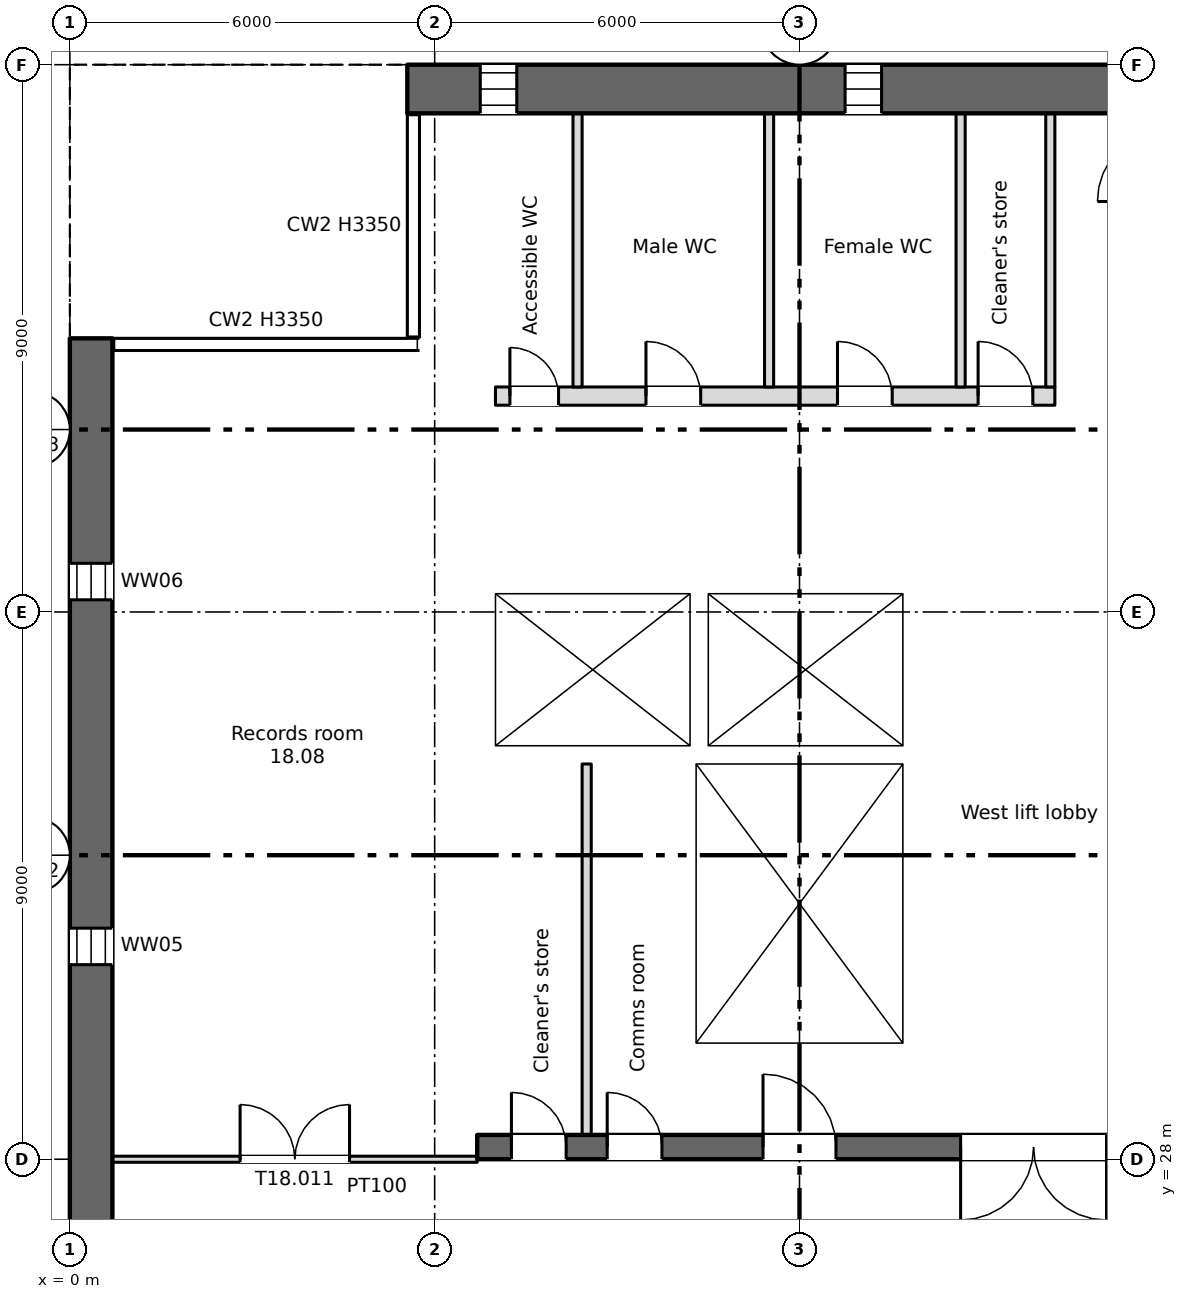
"""IFC4 building model, lengths in metres.
Left out: names, types, materials, properties, quantities, classifications, styles, units other than length and angle.
Written with IfcOpenShell. Run it as: python <this file> out.ifc"""

import sys

from ifc_helpers import new_model, si_unit, direction, frame, frame_2d, origin, place, context, subcontext, project, spatial, rectangle, extrude, element, fill, save


model = new_model("IFC4")
c1 = context("Model", 3, precision=1e-05, world=origin(), true_north=direction((0.0, 1.0)))
c2 = subcontext(c1, "Body", "Model", "MODEL_VIEW")
j1 = project(units=[si_unit("LENGTHUNIT", "METRE"), si_unit("PLANEANGLEUNIT", "RADIAN")], contexts=[c1])
p1 = place(None, origin())
s1 = spatial("IfcSite", under=j1, at=p1, CompositionType="ELEMENT")
p2 = place(p1, origin())
s2 = spatial("IfcBuilding", under=s1, at=p2, CompositionType="ELEMENT")
p3 = place(p2, frame((0.0, 0.0, 113.75)))
s3 = spatial("IfcBuildingStorey", under=s2, at=p3, CompositionType="ELEMENT", Elevation=113.75)
p4 = place(p3, frame((0.35, 6.0, 0.0), z_axis=(0.0, 0.0, 1.0), x_axis=(0.0, 1.0, 0.0)))
e1 = element("IfcWall", 1, at=p4, inside=s3, PredefinedType="SHEAR", context=c2, shape_type="SweptSolid", body=[
    extrude(rectangle(XDim=35.5, YDim=0.7, at=frame_2d((17.75, 0.0))), origin(), (0.0, 0.0, 1.0), 3.35),
])
p5 = place(p4, frame((1.2, 0.0, 0.6)))
e2 = element("IfcOpeningElement", 2, at=p5, cuts=e1, PredefinedType="OPENING", context=c2, shape_type="SweptSolid", body=[
    extrude(rectangle(XDim=0.6, YDim=2.4, at=frame_2d((0.3, 1.2))), frame((0.0, 0.36, 0.0), z_axis=(0.0, -1.0, 0.0), x_axis=(1.0, 0.0, 0.0)), (0.0, 0.0, 1.0), 0.72),
])
p6 = place(p4, frame((7.2, 0.0, 0.6)))
e3 = element("IfcOpeningElement", 3, at=p6, cuts=e1, PredefinedType="OPENING", context=c2, shape_type="SweptSolid", body=[
    extrude(rectangle(XDim=0.6, YDim=2.4, at=frame_2d((0.3, 1.2))), frame((0.0, 0.36, 0.0), z_axis=(0.0, -1.0, 0.0), x_axis=(1.0, 0.0, 0.0)), (0.0, 0.0, 1.0), 0.72),
])
p7 = place(p4, frame((13.2, 0.0, 0.6)))
e4 = element("IfcOpeningElement", 4, at=p7, cuts=e1, PredefinedType="OPENING", context=c2, shape_type="SweptSolid", body=[
    extrude(rectangle(XDim=0.6, YDim=2.4, at=frame_2d((0.3, 1.2))), frame((0.0, 0.36, 0.0), z_axis=(0.0, -1.0, 0.0), x_axis=(1.0, 0.0, 0.0)), (0.0, 0.0, 1.0), 0.72),
])
p8 = place(p4, frame((19.2, 0.0, 0.6)))
e5 = element("IfcOpeningElement", 5, at=p8, cuts=e1, PredefinedType="OPENING", context=c2, shape_type="SweptSolid", body=[
    extrude(rectangle(XDim=0.6, YDim=2.4, at=frame_2d((0.3, 1.2))), frame((0.0, 0.36, 0.0), z_axis=(0.0, -1.0, 0.0), x_axis=(1.0, 0.0, 0.0)), (0.0, 0.0, 1.0), 0.72),
])
p9 = place(p4, frame((25.2, 0.0, 0.6)))
e6 = element("IfcOpeningElement", 6, at=p9, cuts=e1, PredefinedType="OPENING", context=c2, shape_type="SweptSolid", body=[
    extrude(rectangle(XDim=0.6, YDim=2.4, at=frame_2d((0.3, 1.2))), frame((0.0, 0.36, 0.0), z_axis=(0.0, -1.0, 0.0), x_axis=(1.0, 0.0, 0.0)), (0.0, 0.0, 1.0), 0.72),
])
p10 = place(p4, frame((31.2, 0.0, 0.6)))
e7 = element("IfcOpeningElement", 7, at=p10, cuts=e1, PredefinedType="OPENING", context=c2, shape_type="SweptSolid", body=[
    extrude(rectangle(XDim=0.6, YDim=2.4, at=frame_2d((0.3, 1.2))), frame((0.0, 0.36, 0.0), z_axis=(0.0, -1.0, 0.0), x_axis=(1.0, 0.0, 0.0)), (0.0, 0.0, 1.0), 0.72),
])
p11 = place(p3, frame((5.55, 45.6, 0.0), z_axis=(0.0, 0.0, 1.0), x_axis=(1.0, 0.0, 0.0)))
e8 = element("IfcWall", 8, at=p11, inside=s3, PredefinedType="SHEAR", context=c2, shape_type="SweptSolid", body=[
    extrude(rectangle(XDim=60.9, YDim=0.8, at=frame_2d((30.45, 0.0))), origin(), (0.0, 0.0, 1.0), 3.35),
])
p12 = place(p11, frame((1.2, 0.0, 0.6)))
e9 = element("IfcOpeningElement", 9, at=p12, cuts=e8, PredefinedType="OPENING", context=c2, shape_type="SweptSolid", body=[
    extrude(rectangle(XDim=0.6, YDim=2.4, at=frame_2d((0.3, 1.2))), frame((0.0, 0.41, 0.0), z_axis=(0.0, -1.0, 0.0), x_axis=(1.0, 0.0, 0.0)), (0.0, 0.0, 1.0), 0.82),
])
p13 = place(p11, frame((7.2, 0.0, 0.6)))
e10 = element("IfcOpeningElement", 10, at=p13, cuts=e8, PredefinedType="OPENING", context=c2, shape_type="SweptSolid", body=[
    extrude(rectangle(XDim=0.6, YDim=2.4, at=frame_2d((0.3, 1.2))), frame((0.0, 0.41, 0.0), z_axis=(0.0, -1.0, 0.0), x_axis=(1.0, 0.0, 0.0)), (0.0, 0.0, 1.0), 0.82),
])
p14 = place(p3, frame((6.7, 28.2, 0.0), z_axis=(0.0, 0.0, 1.0), x_axis=(1.0, 0.0, 0.0)))
e11 = element("IfcWall", 11, at=p14, inside=s3, PredefinedType="SHEAR", context=c2, shape_type="SweptSolid", body=[
    extrude(rectangle(XDim=57.8, YDim=0.4, at=frame_2d((28.9, 0.0))), origin(), (0.0, 0.0, 1.0), 3.35),
])
p15 = place(p14, frame((12.562, 0.0, 0.0)))
e12 = element("IfcOpeningElement", 12, at=p15, cuts=e11, PredefinedType="OPENING", context=c2, shape_type="SweptSolid", body=[
    extrude(rectangle(XDim=0.9, YDim=2.1, at=frame_2d((0.45, 1.05))), frame((0.0, 0.21, 0.0), z_axis=(0.0, -1.0, 0.0), x_axis=(1.0, 0.0, 0.0)), (0.0, 0.0, 1.0), 0.42),
])
p16 = place(p14, frame((15.137, 0.0, 0.0)))
e13 = element("IfcOpeningElement", 13, at=p16, cuts=e11, PredefinedType="OPENING", context=c2, shape_type="SweptSolid", body=[
    extrude(rectangle(XDim=0.9, YDim=2.1, at=frame_2d((0.45, 1.05))), frame((0.0, 0.21, 0.0), z_axis=(0.0, -1.0, 0.0), x_axis=(1.0, 0.0, 0.0)), (0.0, 0.0, 1.0), 0.42),
])
p17 = place(p14, frame((49.85, 0.0, 0.0)))
e14 = element("IfcOpeningElement", 14, at=p17, cuts=e11, PredefinedType="OPENING", context=c2, shape_type="SweptSolid", body=[
    extrude(rectangle(XDim=0.9, YDim=2.1, at=frame_2d((0.45, 1.05))), frame((0.0, 0.21, 0.0), z_axis=(0.0, -1.0, 0.0), x_axis=(1.0, 0.0, 0.0)), (0.0, 0.0, 1.0), 0.42),
])
p18 = place(p14, frame((0.562, 0.0, 0.0)))
e15 = element("IfcOpeningElement", 15, at=p18, cuts=e11, PredefinedType="OPENING", context=c2, shape_type="SweptSolid", body=[
    extrude(rectangle(XDim=0.9, YDim=2.1, at=frame_2d((0.45, 1.05))), frame((0.0, 0.21, 0.0), z_axis=(0.0, -1.0, 0.0), x_axis=(1.0, 0.0, 0.0)), (0.0, 0.0, 1.0), 0.42),
])
p19 = place(p14, frame((2.137, 0.0, 0.0)))
e16 = element("IfcOpeningElement", 16, at=p19, cuts=e11, PredefinedType="OPENING", context=c2, shape_type="SweptSolid", body=[
    extrude(rectangle(XDim=0.9, YDim=2.1, at=frame_2d((0.45, 1.05))), frame((0.0, 0.21, 0.0), z_axis=(0.0, -1.0, 0.0), x_axis=(1.0, 0.0, 0.0)), (0.0, 0.0, 1.0), 0.42),
])
p20 = place(p14, frame((4.7, 0.0, 0.0)))
e17 = element("IfcOpeningElement", 17, at=p20, cuts=e11, PredefinedType="OPENING", context=c2, shape_type="SweptSolid", body=[
    extrude(rectangle(XDim=1.2, YDim=2.1, at=frame_2d((0.6, 1.05))), frame((0.0, 0.21, 0.0), z_axis=(0.0, -1.0, 0.0), x_axis=(1.0, 0.0, 0.0)), (0.0, 0.0, 1.0), 0.42),
])
p21 = place(p14, frame((31.7, 0.0, 0.0)))
e18 = element("IfcOpeningElement", 18, at=p21, cuts=e11, PredefinedType="OPENING", context=c2, shape_type="SweptSolid", body=[
    extrude(rectangle(XDim=1.2, YDim=2.1, at=frame_2d((0.6, 1.05))), frame((0.0, 0.21, 0.0), z_axis=(0.0, -1.0, 0.0), x_axis=(1.0, 0.0, 0.0)), (0.0, 0.0, 1.0), 0.42),
])
p22 = place(p14, frame((55.2, 0.0, 0.0)))
e19 = element("IfcOpeningElement", 19, at=p22, cuts=e11, PredefinedType="OPENING", context=c2, shape_type="SweptSolid", body=[
    extrude(rectangle(XDim=1.2, YDim=2.1, at=frame_2d((0.6, 1.05))), frame((0.0, 0.21, 0.0), z_axis=(0.0, -1.0, 0.0), x_axis=(1.0, 0.0, 0.0)), (0.0, 0.0, 1.0), 0.42),
])
p23 = place(p14, frame((21.7, 0.0, 0.0)))
e20 = element("IfcOpeningElement", 20, at=p23, cuts=e11, PredefinedType="OPENING", context=c2, shape_type="SweptSolid", body=[
    extrude(rectangle(XDim=1.2, YDim=2.1, at=frame_2d((0.6, 1.05))), frame((0.0, 0.21, 0.0), z_axis=(0.0, -1.0, 0.0), x_axis=(1.0, 0.0, 0.0)), (0.0, 0.0, 1.0), 0.42),
])
p24 = place(p14, frame((41.7, 0.0, 0.0)))
e21 = element("IfcOpeningElement", 21, at=p24, cuts=e11, PredefinedType="OPENING", context=c2, shape_type="SweptSolid", body=[
    extrude(rectangle(XDim=1.2, YDim=2.1, at=frame_2d((0.6, 1.05))), frame((0.0, 0.21, 0.0), z_axis=(0.0, -1.0, 0.0), x_axis=(1.0, 0.0, 0.0)), (0.0, 0.0, 1.0), 0.42),
])
p25 = place(p14, frame((24.85, 0.0, 0.0)))
e22 = element("IfcOpeningElement", 22, at=p25, cuts=e11, PredefinedType="OPENING", context=c2, shape_type="SweptSolid", body=[
    extrude(rectangle(XDim=2.4, YDim=2.1, at=frame_2d((1.2, 1.05))), frame((0.0, 0.21, 0.0), z_axis=(0.0, -1.0, 0.0), x_axis=(1.0, 0.0, 0.0)), (0.0, 0.0, 1.0), 0.42),
])
p26 = place(p14, frame((37.35, 0.0, 0.0)))
e23 = element("IfcOpeningElement", 23, at=p26, cuts=e11, PredefinedType="OPENING", context=c2, shape_type="SweptSolid", body=[
    extrude(rectangle(XDim=2.4, YDim=2.1, at=frame_2d((1.2, 1.05))), frame((0.0, 0.21, 0.0), z_axis=(0.0, -1.0, 0.0), x_axis=(1.0, 0.0, 0.0)), (0.0, 0.0, 1.0), 0.42),
])
p27 = place(p14, frame((7.95, 0.0, 0.0)))
e24 = element("IfcOpeningElement", 24, at=p27, cuts=e11, PredefinedType="OPENING", context=c2, shape_type="SweptSolid", body=[
    extrude(rectangle(XDim=2.4, YDim=2.1, at=frame_2d((1.2, 1.05))), frame((0.0, 0.21, 0.0), z_axis=(0.0, -1.0, 0.0), x_axis=(1.0, 0.0, 0.0)), (0.0, 0.0, 1.0), 0.42),
])
p28 = place(p14, frame((28.85, 0.0, 0.0)))
e25 = element("IfcOpeningElement", 25, at=p28, cuts=e11, PredefinedType="OPENING", context=c2, shape_type="SweptSolid", body=[
    extrude(rectangle(XDim=0.9, YDim=2.1, at=frame_2d((0.45, 1.05))), frame((0.0, 0.21, 0.0), z_axis=(0.0, -1.0, 0.0), x_axis=(1.0, 0.0, 0.0)), (0.0, 0.0, 1.0), 0.42),
])
p29 = place(p14, frame((34.85, 0.0, 0.0)))
e26 = element("IfcOpeningElement", 26, at=p29, cuts=e11, PredefinedType="OPENING", context=c2, shape_type="SweptSolid", body=[
    extrude(rectangle(XDim=0.9, YDim=2.1, at=frame_2d((0.45, 1.05))), frame((0.0, 0.21, 0.0), z_axis=(0.0, -1.0, 0.0), x_axis=(1.0, 0.0, 0.0)), (0.0, 0.0, 1.0), 0.42),
])
p30 = place(p3, frame((6.85, 28.4, 0.0), z_axis=(0.0, 0.0, 1.0), x_axis=(0.0, 1.0, 0.0)))
e27 = element("IfcWall", 27, at=p30, inside=s3, PredefinedType="SHEAR", context=c2, shape_type="SweptSolid", body=[
    extrude(rectangle(XDim=16.8, YDim=0.3, at=frame_2d((8.4, 0.0))), origin(), (0.0, 0.0, 1.0), 3.35),
])
for number, where, z_axis, x_axis in (
    (28, (10.15, 28.4, 0.0), (0.0, 0.0, 1.0), (0.0, 1.0, 0.0)),
    (29, (13.85, 28.4, 0.0), (0.0, 0.0, 1.0), (0.0, 1.0, 0.0)),
):
    element("IfcWall", number, at=place(p3, frame(where, z_axis=z_axis, x_axis=x_axis)), inside=s3, PredefinedType="SHEAR", context=c2, shape_type="SweptSolid", body=[
        extrude(rectangle(XDim=6.1, YDim=0.3, at=frame_2d((3.05, 0.0))), origin(), (0.0, 0.0, 1.0), 3.35),
    ])
for number, where, z_axis, x_axis in (
    (30, (7.0, 34.65, 0.0), (0.0, 0.0, 1.0), (1.0, 0.0, 0.0)),
    (31, (7.0, 37.45, 0.0), (0.0, 0.0, 1.0), (1.0, 0.0, 0.0)),
):
    element("IfcWall", number, at=place(p3, frame(where, z_axis=z_axis, x_axis=x_axis)), inside=s3, PredefinedType="SHEAR", context=c2, shape_type="SweptSolid", body=[
        extrude(rectangle(XDim=7.0, YDim=0.3, at=frame_2d((3.5, 0.0))), origin(), (0.0, 0.0, 1.0), 3.35),
    ])
p31 = place(p3, frame((13.85, 34.8, 0.0), z_axis=(0.0, 0.0, 1.0), x_axis=(0.0, 1.0, 0.0)))
e32 = element("IfcWall", 32, at=p31, inside=s3, PredefinedType="SHEAR", context=c2, shape_type="SweptSolid", body=[
    extrude(rectangle(XDim=2.5, YDim=0.3, at=frame_2d((1.25, 0.0))), origin(), (0.0, 0.0, 1.0), 3.35),
])
p32 = place(p3, frame((7.0, 40.55, 0.0), z_axis=(0.0, 0.0, 1.0), x_axis=(1.0, 0.0, 0.0)))
e33 = element("IfcWall", 33, at=p32, inside=s3, PredefinedType="PARTITIONING", context=c2, shape_type="SweptSolid", body=[
    extrude(rectangle(XDim=9.2, YDim=0.3, at=frame_2d((4.6, 0.0))), origin(), (0.0, 0.0, 1.0), 3.35),
])
p33 = place(p32, frame((0.238, 0.0, 0.0)))
e34 = element("IfcOpeningElement", 34, at=p33, cuts=e33, PredefinedType="OPENING", context=c2, shape_type="SweptSolid", body=[
    extrude(rectangle(XDim=0.8, YDim=2.1, at=frame_2d((0.4, 1.05))), frame((0.0, 0.16, 0.0), z_axis=(0.0, -1.0, 0.0), x_axis=(1.0, 0.0, 0.0)), (0.0, 0.0, 1.0), 0.32),
])
p34 = place(p32, frame((2.475, 0.0, 0.0)))
e35 = element("IfcOpeningElement", 35, at=p34, cuts=e33, PredefinedType="OPENING", context=c2, shape_type="SweptSolid", body=[
    extrude(rectangle(XDim=0.9, YDim=2.1, at=frame_2d((0.45, 1.05))), frame((0.0, 0.16, 0.0), z_axis=(0.0, -1.0, 0.0), x_axis=(1.0, 0.0, 0.0)), (0.0, 0.0, 1.0), 0.32),
])
p35 = place(p32, frame((5.625, 0.0, 0.0)))
e36 = element("IfcOpeningElement", 36, at=p35, cuts=e33, PredefinedType="OPENING", context=c2, shape_type="SweptSolid", body=[
    extrude(rectangle(XDim=0.9, YDim=2.1, at=frame_2d((0.45, 1.05))), frame((0.0, 0.16, 0.0), z_axis=(0.0, -1.0, 0.0), x_axis=(1.0, 0.0, 0.0)), (0.0, 0.0, 1.0), 0.32),
])
p36 = place(p32, frame((7.938, 0.0, 0.0)))
e37 = element("IfcOpeningElement", 37, at=p36, cuts=e33, PredefinedType="OPENING", context=c2, shape_type="SweptSolid", body=[
    extrude(rectangle(XDim=0.9, YDim=2.1, at=frame_2d((0.45, 1.05))), frame((0.0, 0.16, 0.0), z_axis=(0.0, -1.0, 0.0), x_axis=(1.0, 0.0, 0.0)), (0.0, 0.0, 1.0), 0.32),
])
p37 = place(p3, frame((10.35, 34.8, 0.0), z_axis=(0.0, 0.0, 1.0), x_axis=(0.0, 1.0, 0.0)))
e38 = element("IfcWall", 38, at=p37, inside=s3, PredefinedType="SHEAR", context=c2, shape_type="SweptSolid", body=[
    extrude(rectangle(XDim=2.5, YDim=0.3, at=frame_2d((1.25, 0.0))), origin(), (0.0, 0.0, 1.0), 3.35),
])
p38 = place(p3, frame((16.125, 40.7, 0.0), z_axis=(0.0, 0.0, 1.0), x_axis=(0.0, 1.0, 0.0)))
e39 = element("IfcWall", 39, at=p38, inside=s3, PredefinedType="PARTITIONING", context=c2, shape_type="SweptSolid", body=[
    extrude(rectangle(XDim=4.5, YDim=0.15, at=frame_2d((2.25, 0.0))), origin(), (0.0, 0.0, 1.0), 3.35),
])
p39 = place(p3, frame((8.5, 28.4, 0.0), z_axis=(0.0, 0.0, 1.0), x_axis=(0.0, 1.0, 0.0)))
e40 = element("IfcWall", 40, at=p39, inside=s3, PredefinedType="PARTITIONING", context=c2, shape_type="SweptSolid", body=[
    extrude(rectangle(XDim=6.1, YDim=0.15, at=frame_2d((3.05, 0.0))), origin(), (0.0, 0.0, 1.0), 3.35),
])
for number, where, z_axis, x_axis in (
    (41, (8.35, 40.7, 0.0), (0.0, 0.0, 1.0), (0.0, 1.0, 0.0)),
    (42, (11.5, 40.7, 0.0), (0.0, 0.0, 1.0), (0.0, 1.0, 0.0)),
    (43, (14.65, 40.7, 0.0), (0.0, 0.0, 1.0), (0.0, 1.0, 0.0)),
):
    element("IfcWall", number, at=place(p3, frame(where, z_axis=z_axis, x_axis=x_axis)), inside=s3, PredefinedType="PARTITIONING", context=c2, shape_type="SweptSolid", body=[
        extrude(rectangle(XDim=4.5, YDim=0.15, at=frame_2d((2.25, 0.0))), origin(), (0.0, 0.0, 1.0), 3.35),
    ])
p40 = place(p3, frame((0.7, 28.0, 0.0), z_axis=(0.0, 0.0, 1.0), x_axis=(1.0, 0.0, 0.0)))
e44 = element("IfcWall", 44, at=p40, inside=s3, PredefinedType="PARTITIONING", context=c2, shape_type="SweptSolid", body=[
    extrude(rectangle(XDim=6.0, YDim=0.1, at=frame_2d((3.0, 0.0))), origin(), (0.0, 0.0, 1.0), 3.35),
])
p41 = place(p40, frame((2.1, 0.0, 0.0)))
e45 = element("IfcOpeningElement", 45, at=p41, cuts=e44, PredefinedType="OPENING", context=c2, shape_type="SweptSolid", body=[
    extrude(rectangle(XDim=1.8, YDim=2.1, at=frame_2d((0.9, 1.05))), frame((0.0, 0.06, 0.0), z_axis=(0.0, -1.0, 0.0), x_axis=(1.0, 0.0, 0.0)), (0.0, 0.0, 1.0), 0.12),
])
p42 = place(p12, origin())
e46 = element("IfcWindow", 46, at=p42, inside=s3, PartitioningType="SINGLE_PANEL", PredefinedType="WINDOW", context=c2, shape_type="SweptSolid", body=[
    extrude(rectangle(XDim=0.6, YDim=2.4, at=frame_2d((0.3, 1.2))), frame((0.0, 0.03, 0.0), z_axis=(0.0, -1.0, 0.0), x_axis=(1.0, 0.0, 0.0)), (0.0, 0.0, 1.0), 0.06),
])
fill(e9, e46)
p43 = place(p13, origin())
e47 = element("IfcWindow", 47, at=p43, inside=s3, PartitioningType="SINGLE_PANEL", PredefinedType="WINDOW", context=c2, shape_type="SweptSolid", body=[
    extrude(rectangle(XDim=0.6, YDim=2.4, at=frame_2d((0.3, 1.2))), frame((0.0, 0.03, 0.0), z_axis=(0.0, -1.0, 0.0), x_axis=(1.0, 0.0, 0.0)), (0.0, 0.0, 1.0), 0.06),
])
fill(e10, e47)
p44 = place(p9, origin())
e48 = element("IfcWindow", 48, at=p44, inside=s3, PartitioningType="SINGLE_PANEL", PredefinedType="WINDOW", context=c2, shape_type="SweptSolid", body=[
    extrude(rectangle(XDim=0.6, YDim=2.4, at=frame_2d((0.3, 1.2))), frame((0.0, 0.03, 0.0), z_axis=(0.0, -1.0, 0.0), x_axis=(1.0, 0.0, 0.0)), (0.0, 0.0, 1.0), 0.06),
])
fill(e6, e48)
p45 = place(p10, origin())
e49 = element("IfcWindow", 49, at=p45, inside=s3, PartitioningType="SINGLE_PANEL", PredefinedType="WINDOW", context=c2, shape_type="SweptSolid", body=[
    extrude(rectangle(XDim=0.6, YDim=2.4, at=frame_2d((0.3, 1.2))), frame((0.0, 0.03, 0.0), z_axis=(0.0, -1.0, 0.0), x_axis=(1.0, 0.0, 0.0)), (0.0, 0.0, 1.0), 0.06),
])
fill(e7, e49)
p46 = place(p18, origin())
e50 = element("IfcDoor", 50, at=p46, inside=s3, OperationType="SINGLE_SWING_LEFT", PredefinedType="DOOR", context=c2, shape_type="SweptSolid", body=[
    extrude(rectangle(XDim=0.9, YDim=2.1, at=frame_2d((0.45, 1.05))), frame((0.0, 0.025, 0.0), z_axis=(0.0, -1.0, 0.0), x_axis=(1.0, 0.0, 0.0)), (0.0, 0.0, 1.0), 0.05),
])
fill(e15, e50)
p47 = place(p19, origin())
e51 = element("IfcDoor", 51, at=p47, inside=s3, OperationType="SINGLE_SWING_LEFT", PredefinedType="DOOR", context=c2, shape_type="SweptSolid", body=[
    extrude(rectangle(XDim=0.9, YDim=2.1, at=frame_2d((0.45, 1.05))), frame((0.0, 0.025, 0.0), z_axis=(0.0, -1.0, 0.0), x_axis=(1.0, 0.0, 0.0)), (0.0, 0.0, 1.0), 0.05),
])
fill(e16, e51)
p48 = place(p33, origin())
e52 = element("IfcDoor", 52, at=p48, inside=s3, OperationType="SINGLE_SWING_LEFT", PredefinedType="DOOR", context=c2, shape_type="SweptSolid", body=[
    extrude(rectangle(XDim=0.8, YDim=2.1, at=frame_2d((0.4, 1.05))), frame((0.0, 0.025, 0.0), z_axis=(0.0, -1.0, 0.0), x_axis=(1.0, 0.0, 0.0)), (0.0, 0.0, 1.0), 0.05),
])
fill(e34, e52)
p49 = place(p34, origin())
e53 = element("IfcDoor", 53, at=p49, inside=s3, OperationType="SINGLE_SWING_LEFT", PredefinedType="DOOR", context=c2, shape_type="SweptSolid", body=[
    extrude(rectangle(XDim=0.9, YDim=2.1, at=frame_2d((0.45, 1.05))), frame((0.0, 0.025, 0.0), z_axis=(0.0, -1.0, 0.0), x_axis=(1.0, 0.0, 0.0)), (0.0, 0.0, 1.0), 0.05),
])
fill(e35, e53)
p50 = place(p35, origin())
e54 = element("IfcDoor", 54, at=p50, inside=s3, OperationType="SINGLE_SWING_LEFT", PredefinedType="DOOR", context=c2, shape_type="SweptSolid", body=[
    extrude(rectangle(XDim=0.9, YDim=2.1, at=frame_2d((0.45, 1.05))), frame((0.0, 0.025, 0.0), z_axis=(0.0, -1.0, 0.0), x_axis=(1.0, 0.0, 0.0)), (0.0, 0.0, 1.0), 0.05),
])
fill(e36, e54)
p51 = place(p36, origin())
e55 = element("IfcDoor", 55, at=p51, inside=s3, OperationType="SINGLE_SWING_LEFT", PredefinedType="DOOR", context=c2, shape_type="SweptSolid", body=[
    extrude(rectangle(XDim=0.9, YDim=2.1, at=frame_2d((0.45, 1.05))), frame((0.0, 0.025, 0.0), z_axis=(0.0, -1.0, 0.0), x_axis=(1.0, 0.0, 0.0)), (0.0, 0.0, 1.0), 0.05),
])
fill(e37, e55)
p52 = place(p20, origin())
e56 = element("IfcDoor", 56, at=p52, inside=s3, OperationType="SINGLE_SWING_LEFT", PredefinedType="DOOR", context=c2, shape_type="SweptSolid", body=[
    extrude(rectangle(XDim=1.2, YDim=2.1, at=frame_2d((0.6, 1.05))), frame((0.0, 0.025, 0.0), z_axis=(0.0, -1.0, 0.0), x_axis=(1.0, 0.0, 0.0)), (0.0, 0.0, 1.0), 0.05),
])
fill(e17, e56)
p53 = place(p27, origin())
e57 = element("IfcDoor", 57, at=p53, inside=s3, OperationType="DOUBLE_DOOR_SINGLE_SWING", PredefinedType="DOOR", context=c2, shape_type="SweptSolid", body=[
    extrude(rectangle(XDim=2.4, YDim=2.1, at=frame_2d((1.2, 1.05))), frame((0.0, 0.025, 0.0), z_axis=(0.0, -1.0, 0.0), x_axis=(1.0, 0.0, 0.0)), (0.0, 0.0, 1.0), 0.05),
])
fill(e24, e57)
p54 = place(p41, origin())
e58 = element("IfcDoor", 58, at=p54, inside=s3, OperationType="DOUBLE_DOOR_SINGLE_SWING", PredefinedType="DOOR", context=c2, shape_type="SweptSolid", body=[
    extrude(rectangle(XDim=1.8, YDim=2.1, at=frame_2d((0.9, 1.05))), frame((0.0, 0.025, 0.0), z_axis=(0.0, -1.0, 0.0), x_axis=(1.0, 0.0, 0.0)), (0.0, 0.0, 1.0), 0.05),
])
fill(e45, e58)
save(model, sys.argv[1])
